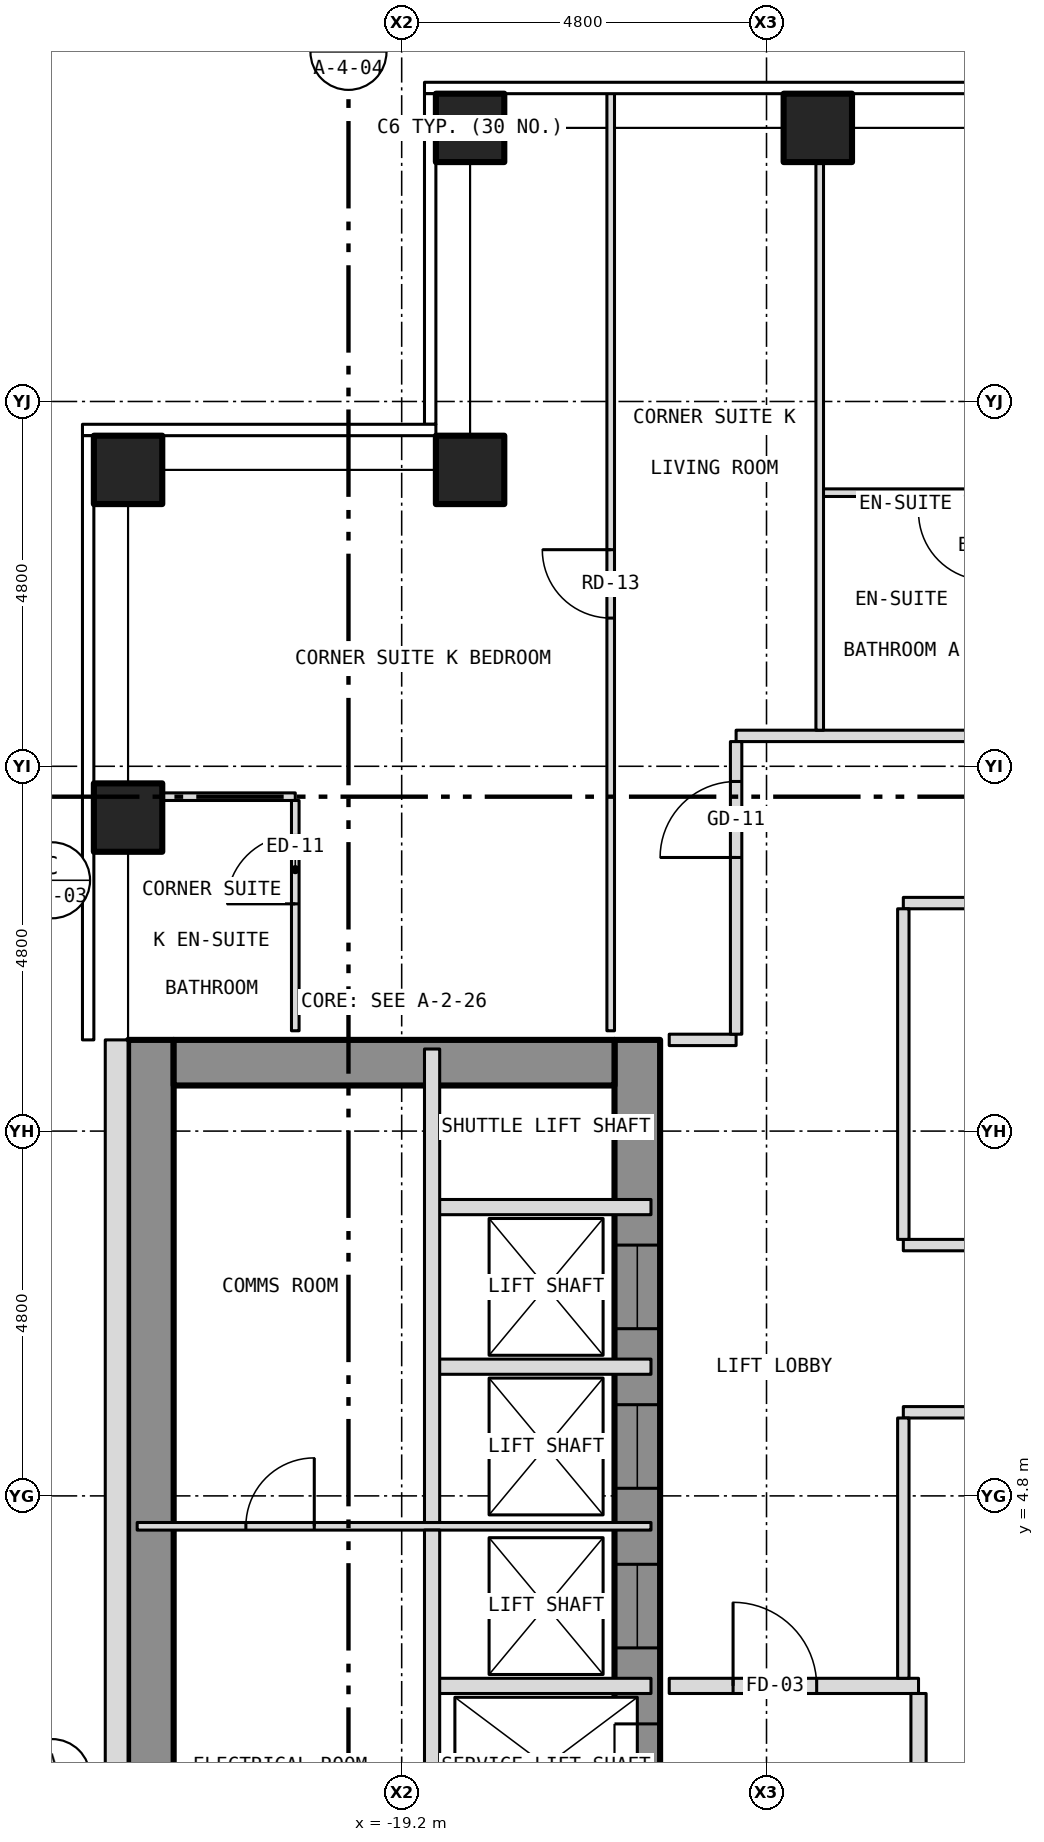
"""IFC4 building model, lengths in metres.
Left out: names, types, materials, properties, quantities, classifications, styles, units other than length and angle.
Written with IfcOpenShell. Run it as: python <this file> out.ifc"""

import sys

from ifc_helpers import new_model, si_unit, direction, frame, frame_2d, origin, origin_2d, place, context, subcontext, project, spatial, rectangle, hollow_rectangle, extrude, element, fill, save


model = new_model("IFC4")
c1 = context("Model", 3, precision=1e-05, world=origin(), true_north=direction((0.0, 1.0)))
c2 = subcontext(c1, "Body", "Model", "MODEL_VIEW")
j1 = project(units=[si_unit("LENGTHUNIT", "METRE"), si_unit("PLANEANGLEUNIT", "RADIAN")], contexts=[c1])
p1 = place(None, origin())
s1 = spatial("IfcSite", under=j1, at=p1, CompositionType="ELEMENT")
p2 = place(p1, origin())
s2 = spatial("IfcBuilding", under=s1, at=p2, CompositionType="ELEMENT")
p3 = place(p2, frame((0.0, 0.0, 96.0)))
s3 = spatial("IfcBuildingStorey", under=s2, at=p3, CompositionType="ELEMENT", Elevation=96.0)
for number, where, z_axis, x_axis in (
    (1, (-18.3, 22.8, -0.15), (0.0, 0.0, 1.0), (1.0, 0.0, 0.0)),
    (2, (-13.725, 22.8, -0.15), (0.0, 0.0, 1.0), (1.0, 0.0, 0.0)),
    (3, (-22.8, 13.725, -0.15), (0.0, 0.0, 1.0), (1.0, 0.0, 0.0)),
    (4, (-22.8, 18.3, -0.15), (0.0, 0.0, 1.0), (1.0, 0.0, 0.0)),
    (5, (-18.3, 18.3, -0.15), (0.0, 0.0, 1.0), (1.0, 0.0, 0.0)),
):
    element("IfcColumn", number, at=place(p3, frame(where, z_axis=z_axis, x_axis=x_axis)), inside=s3, PredefinedType="COLUMN", context=c2, shape_type="SweptSolid", body=[
        extrude(hollow_rectangle(XDim=0.9, YDim=0.9, WallThickness=0.05, at=origin_2d()), origin(), (0.0, 0.0, 1.0), 3.5),
    ])
p4 = place(p3, frame((-16.1, -10.8, 0.0), z_axis=(0.0, 0.0, 1.0), x_axis=(0.0, 1.0, 0.0)))
e6 = element("IfcWall", 6, at=p4, inside=s3, PredefinedType="SHEAR", context=c2, shape_type="SweptSolid", body=[
    extrude(rectangle(XDim=21.6, YDim=0.6, at=frame_2d((10.8, 0.0))), origin(), (0.0, 0.0, 1.0), 3.25),
])
p5 = place(p4, frame((9.4, 0.0, 0.0)))
e7 = element("IfcOpeningElement", 7, at=p5, cuts=e6, PredefinedType="OPENING", context=c2, shape_type="SweptSolid", body=[
    extrude(rectangle(XDim=1.1, YDim=2.1, at=frame_2d((0.55, 1.05))), frame((0.0, 0.312, 0.0), z_axis=(0.0, -1.0, 0.0), x_axis=(1.0, 0.0, 0.0)), (0.0, 0.0, 1.0), 0.624),
])
p6 = place(p4, frame((11.5, 0.0, 0.0)))
e8 = element("IfcOpeningElement", 8, at=p6, cuts=e6, PredefinedType="OPENING", context=c2, shape_type="SweptSolid", body=[
    extrude(rectangle(XDim=1.1, YDim=2.1, at=frame_2d((0.55, 1.05))), frame((0.0, 0.312, 0.0), z_axis=(0.0, -1.0, 0.0), x_axis=(1.0, 0.0, 0.0)), (0.0, 0.0, 1.0), 0.624),
])
p7 = place(p4, frame((13.6, 0.0, 0.0)))
e9 = element("IfcOpeningElement", 9, at=p7, cuts=e6, PredefinedType="OPENING", context=c2, shape_type="SweptSolid", body=[
    extrude(rectangle(XDim=1.1, YDim=2.1, at=frame_2d((0.55, 1.05))), frame((0.0, 0.312, 0.0), z_axis=(0.0, -1.0, 0.0), x_axis=(1.0, 0.0, 0.0)), (0.0, 0.0, 1.0), 0.624),
])
p8 = place(p4, frame((15.7, 0.0, 0.0)))
e10 = element("IfcOpeningElement", 10, at=p8, cuts=e6, PredefinedType="OPENING", context=c2, shape_type="SweptSolid", body=[
    extrude(rectangle(XDim=1.1, YDim=2.1, at=frame_2d((0.55, 1.05))), frame((0.0, 0.312, 0.0), z_axis=(0.0, -1.0, 0.0), x_axis=(1.0, 0.0, 0.0)), (0.0, 0.0, 1.0), 0.624),
])
p9 = place(p4, frame((17.8, 0.0, 0.0)))
e11 = element("IfcOpeningElement", 11, at=p9, cuts=e6, PredefinedType="OPENING", context=c2, shape_type="SweptSolid", body=[
    extrude(rectangle(XDim=1.1, YDim=2.1, at=frame_2d((0.55, 1.05))), frame((0.0, 0.312, 0.0), z_axis=(0.0, -1.0, 0.0), x_axis=(1.0, 0.0, 0.0)), (0.0, 0.0, 1.0), 0.624),
])
p10 = place(p4, frame((0.758, 0.0, 0.0)))
e12 = element("IfcOpeningElement", 12, at=p10, cuts=e6, PredefinedType="OPENING", context=c2, shape_type="SweptSolid", body=[
    extrude(rectangle(XDim=1.1, YDim=2.1, at=frame_2d((0.55, 1.05))), frame((0.0, 0.312, 0.0), z_axis=(0.0, -1.0, 0.0), x_axis=(1.0, 0.0, 0.0)), (0.0, 0.0, 1.0), 0.624),
])
p11 = place(p4, frame((7.5, 0.0, 0.0)))
e13 = element("IfcOpeningElement", 13, at=p11, cuts=e6, PredefinedType="OPENING", context=c2, shape_type="SweptSolid", body=[
    extrude(rectangle(XDim=1.1, YDim=2.1, at=frame_2d((0.55, 1.05))), frame((0.0, 0.312, 0.0), z_axis=(0.0, -1.0, 0.0), x_axis=(1.0, 0.0, 0.0)), (0.0, 0.0, 1.0), 0.624),
])
p12 = place(p3, frame((-22.5, -10.8, 0.0), z_axis=(0.0, 0.0, 1.0), x_axis=(0.0, 1.0, 0.0)))
e14 = element("IfcWall", 14, at=p12, inside=s3, PredefinedType="SHEAR", context=c2, shape_type="SweptSolid", body=[
    extrude(rectangle(XDim=21.6, YDim=0.6, at=frame_2d((10.8, 0.0))), origin(), (0.0, 0.0, 1.0), 3.25),
])
p13 = place(p3, frame((-22.2, 10.5, 0.0), z_axis=(0.0, 0.0, 1.0), x_axis=(1.0, 0.0, 0.0)))
e15 = element("IfcWall", 15, at=p13, inside=s3, PredefinedType="SHEAR", context=c2, shape_type="SweptSolid", body=[
    extrude(rectangle(XDim=5.8, YDim=0.6, at=frame_2d((2.9, 0.0))), origin(), (0.0, 0.0, 1.0), 3.25),
])
p14 = place(p3, frame((-22.95, 10.8, 0.0), z_axis=(0.0, 0.0, 1.0), x_axis=(0.0, -1.0, 0.0)))
e16 = element("IfcWall", 16, at=p14, inside=s3, PredefinedType="SOLIDWALL", context=c2, shape_type="SweptSolid", body=[
    extrude(rectangle(XDim=21.6, YDim=0.3, at=frame_2d((10.8, 0.0))), origin(), (0.0, 0.0, 1.0), 3.5),
])
p15 = place(p14, frame((18.05, 0.0, 1.0)))
e17 = element("IfcOpeningElement", 17, at=p15, cuts=e16, PredefinedType="OPENING", context=c2, shape_type="SweptSolid", body=[
    extrude(rectangle(XDim=0.6, YDim=1.5, at=frame_2d((0.3, 0.75))), frame((0.0, 0.162, 0.0), z_axis=(0.0, -1.0, 0.0), x_axis=(1.0, 0.0, 0.0)), (0.0, 0.0, 1.0), 0.324),
])
p16 = place(p3, frame((-18.8, 2.3, 0.0), z_axis=(0.0, 0.0, 1.0), x_axis=(1.0, 0.0, 0.0)))
e18 = element("IfcWall", 18, at=p16, inside=s3, PredefinedType="PARTITIONING", context=c2, shape_type="SweptSolid", body=[
    extrude(rectangle(XDim=2.88, YDim=0.2, at=frame_2d((1.44, 0.0))), origin(), (0.0, 0.0, 1.0), 3.25),
])
p17 = place(p3, frame((-15.68, 2.3, 0.0), z_axis=(0.0, 0.0, 1.0), x_axis=(1.0, 0.0, 0.0)))
e19 = element("IfcWall", 19, at=p17, inside=s3, PredefinedType="PARTITIONING", context=c2, shape_type="SweptSolid", body=[
    extrude(rectangle(XDim=3.28, YDim=0.2, at=frame_2d((1.64, 0.0))), origin(), (0.0, 0.0, 1.0), 3.35),
])
p18 = place(p17, frame((0.84, 0.0, 0.0)))
e20 = element("IfcOpeningElement", 20, at=p18, cuts=e19, PredefinedType="OPENING", context=c2, shape_type="SweptSolid", body=[
    extrude(rectangle(XDim=1.1, YDim=2.1, at=frame_2d((0.55, 1.05))), frame((0.0, 0.112, 0.0), z_axis=(0.0, -1.0, 0.0), x_axis=(1.0, 0.0, 0.0)), (0.0, 0.0, 1.0), 0.224),
])
p19 = place(p3, frame((-22.68, 4.4, 0.0), z_axis=(0.0, 0.0, 1.0), x_axis=(1.0, 0.0, 0.0)))
e21 = element("IfcWall", 21, at=p19, inside=s3, PredefinedType="PARTITIONING", context=c2, shape_type="SweptSolid", body=[
    extrude(rectangle(XDim=6.76, YDim=0.1, at=frame_2d((3.38, 0.0))), origin(), (0.0, 0.0, 1.0), 3.25),
])
p20 = place(p19, frame((1.43, 0.0, 0.0)))
e22 = element("IfcOpeningElement", 22, at=p20, cuts=e21, PredefinedType="OPENING", context=c2, shape_type="SweptSolid", body=[
    extrude(rectangle(XDim=0.9, YDim=2.1, at=frame_2d((0.45, 1.05))), frame((0.0, 0.062, 0.0), z_axis=(0.0, -1.0, 0.0), x_axis=(1.0, 0.0, 0.0)), (0.0, 0.0, 1.0), 0.124),
])
p21 = place(p3, frame((-12.6, 5.9, 0.0), z_axis=(0.0, 0.0, 1.0), x_axis=(1.0, 0.0, 0.0)))
e23 = element("IfcWall", 23, at=p21, inside=s3, PredefinedType="PARTITIONING", context=c2, shape_type="SweptSolid", body=[
    extrude(rectangle(XDim=13.7, YDim=0.15, at=frame_2d((6.85, 0.0))), origin(), (0.0, 0.0, 1.0), 3.35),
])
p22 = place(p3, frame((-18.8, 6.5, 0.0), z_axis=(0.0, 0.0, 1.0), x_axis=(1.0, 0.0, 0.0)))
e24 = element("IfcWall", 24, at=p22, inside=s3, PredefinedType="PARTITIONING", context=c2, shape_type="SweptSolid", body=[
    extrude(rectangle(XDim=2.88, YDim=0.2, at=frame_2d((1.44, 0.0))), origin(), (0.0, 0.0, 1.0), 3.25),
])
p23 = place(p3, frame((-12.6, 8.1, 0.0), z_axis=(0.0, 0.0, 1.0), x_axis=(1.0, 0.0, 0.0)))
e25 = element("IfcWall", 25, at=p23, inside=s3, PredefinedType="PARTITIONING", context=c2, shape_type="SweptSolid", body=[
    extrude(rectangle(XDim=13.7, YDim=0.15, at=frame_2d((6.85, 0.0))), origin(), (0.0, 0.0, 1.0), 3.35),
])
p24 = place(p23, frame((6.4, 0.0, 0.0)))
e26 = element("IfcOpeningElement", 26, at=p24, cuts=e25, PredefinedType="OPENING", context=c2, shape_type="SweptSolid", body=[
    extrude(rectangle(XDim=0.9, YDim=2.1, at=frame_2d((0.45, 1.05))), frame((0.0, 0.087, 0.0), z_axis=(0.0, -1.0, 0.0), x_axis=(1.0, 0.0, 0.0)), (0.0, 0.0, 1.0), 0.174),
])
p25 = place(p3, frame((-18.8, 8.6, 0.0), z_axis=(0.0, 0.0, 1.0), x_axis=(1.0, 0.0, 0.0)))
e27 = element("IfcWall", 27, at=p25, inside=s3, PredefinedType="PARTITIONING", context=c2, shape_type="SweptSolid", body=[
    extrude(rectangle(XDim=2.88, YDim=0.2, at=frame_2d((1.44, 0.0))), origin(), (0.0, 0.0, 1.0), 3.25),
])
p26 = place(p3, frame((-15.68, 10.8, 0.0), z_axis=(0.0, 0.0, 1.0), x_axis=(1.0, 0.0, 0.0)))
e28 = element("IfcWall", 28, at=p26, inside=s3, PredefinedType="PARTITIONING", context=c2, shape_type="SweptSolid", body=[
    extrude(rectangle(XDim=0.88, YDim=0.15, at=frame_2d((0.44, 0.0))), origin(), (0.0, 0.0, 1.0), 3.35),
])
p27 = place(p3, frame((-12.6, 12.6, 0.0), z_axis=(0.0, 0.0, 1.0), x_axis=(1.0, 0.0, 0.0)))
e29 = element("IfcWall", 29, at=p27, inside=s3, PredefinedType="PARTITIONING", context=c2, shape_type="SweptSolid", body=[
    extrude(rectangle(XDim=13.7, YDim=0.15, at=frame_2d((6.85, 0.0))), origin(), (0.0, 0.0, 1.0), 3.35),
])
p28 = place(p3, frame((-22.68, 14.0, 0.0), z_axis=(0.0, 0.0, 1.0), x_axis=(1.0, 0.0, 0.0)))
e30 = element("IfcWall", 30, at=p28, inside=s3, PredefinedType="PARTITIONING", context=c2, shape_type="SweptSolid", body=[
    extrude(rectangle(XDim=2.08, YDim=0.1, at=frame_2d((1.04, 0.0))), origin(), (0.0, 0.0, 1.0), 3.35),
])
p29 = place(p3, frame((-14.8, 14.8, 0.0), z_axis=(0.0, 0.0, 1.0), x_axis=(1.0, 0.0, 0.0)))
e31 = element("IfcWall", 31, at=p29, inside=s3, PredefinedType="PARTITIONING", context=c2, shape_type="SweptSolid", body=[
    extrude(rectangle(XDim=29.6, YDim=0.15, at=frame_2d((14.8, 0.0))), origin(), (0.0, 0.0, 1.0), 3.35),
])
p30 = place(p29, frame((5.107, 0.0, 0.0)))
e32 = element("IfcOpeningElement", 32, at=p30, cuts=e31, PredefinedType="OPENING", context=c2, shape_type="SweptSolid", body=[
    extrude(rectangle(XDim=1.0, YDim=2.1, at=frame_2d((0.5, 1.05))), frame((0.0, 0.087, 0.0), z_axis=(0.0, -1.0, 0.0), x_axis=(1.0, 0.0, 0.0)), (0.0, 0.0, 1.0), 0.174),
])
p31 = place(p29, frame((10.826, 0.0, 0.0)))
e33 = element("IfcOpeningElement", 33, at=p31, cuts=e31, PredefinedType="OPENING", context=c2, shape_type="SweptSolid", body=[
    extrude(rectangle(XDim=1.0, YDim=2.1, at=frame_2d((0.5, 1.05))), frame((0.0, 0.087, 0.0), z_axis=(0.0, -1.0, 0.0), x_axis=(1.0, 0.0, 0.0)), (0.0, 0.0, 1.0), 0.174),
])
p32 = place(p29, frame((19.104, 0.0, 0.0)))
e34 = element("IfcOpeningElement", 34, at=p32, cuts=e31, PredefinedType="OPENING", context=c2, shape_type="SweptSolid", body=[
    extrude(rectangle(XDim=1.0, YDim=2.1, at=frame_2d((0.5, 1.05))), frame((0.0, 0.087, 0.0), z_axis=(0.0, -1.0, 0.0), x_axis=(1.0, 0.0, 0.0)), (0.0, 0.0, 1.0), 0.174),
])
p33 = place(p29, frame((25.694, 0.0, 0.0)))
e35 = element("IfcOpeningElement", 35, at=p33, cuts=e31, PredefinedType="OPENING", context=c2, shape_type="SweptSolid", body=[
    extrude(rectangle(XDim=1.0, YDim=2.1, at=frame_2d((0.5, 1.05))), frame((0.0, 0.087, 0.0), z_axis=(0.0, -1.0, 0.0), x_axis=(1.0, 0.0, 0.0)), (0.0, 0.0, 1.0), 0.174),
])
p34 = place(p3, frame((-13.7, 18.0, 0.0), z_axis=(0.0, 0.0, 1.0), x_axis=(1.0, 0.0, 0.0)))
e36 = element("IfcWall", 36, at=p34, inside=s3, PredefinedType="PARTITIONING", context=c2, shape_type="SweptSolid", body=[
    extrude(rectangle(XDim=2.2, YDim=0.1, at=frame_2d((1.1, 0.0))), origin(), (0.0, 0.0, 1.0), 3.35),
])
p35 = place(p3, frame((-20.6, 10.92, 0.0), z_axis=(0.0, 0.0, 1.0), x_axis=(0.0, 1.0, 0.0)))
e37 = element("IfcWall", 37, at=p35, inside=s3, PredefinedType="PARTITIONING", context=c2, shape_type="SweptSolid", body=[
    extrude(rectangle(XDim=3.03, YDim=0.1, at=frame_2d((1.515, 0.0))), origin(), (0.0, 0.0, 1.0), 3.35),
])
p36 = place(p35, frame((1.67, 0.0, 0.0)))
e38 = element("IfcOpeningElement", 38, at=p36, cuts=e37, PredefinedType="OPENING", context=c2, shape_type="SweptSolid", body=[
    extrude(rectangle(XDim=0.9, YDim=2.1, at=frame_2d((0.45, 1.05))), frame((0.0, 0.062, 0.0), z_axis=(0.0, -1.0, 0.0), x_axis=(1.0, 0.0, 0.0)), (0.0, 0.0, 1.0), 0.124),
])
p37 = place(p3, frame((-18.8, -1.8, 0.0), z_axis=(0.0, 0.0, 1.0), x_axis=(0.0, 1.0, 0.0)))
e39 = element("IfcWall", 39, at=p37, inside=s3, PredefinedType="PARTITIONING", context=c2, shape_type="SweptSolid", body=[
    extrude(rectangle(XDim=6.15, YDim=0.2, at=frame_2d((3.075, 0.0))), origin(), (0.0, 0.0, 1.0), 3.25),
])
p38 = place(p3, frame((-18.8, 4.45, 0.0), z_axis=(0.0, 0.0, 1.0), x_axis=(0.0, 1.0, 0.0)))
e40 = element("IfcWall", 40, at=p38, inside=s3, PredefinedType="PARTITIONING", context=c2, shape_type="SweptSolid", body=[
    extrude(rectangle(XDim=6.23, YDim=0.2, at=frame_2d((3.115, 0.0))), origin(), (0.0, 0.0, 1.0), 3.25),
])
p39 = place(p3, frame((-16.45, 10.92, 0.0), z_axis=(0.0, 0.0, 1.0), x_axis=(0.0, 1.0, 0.0)))
e41 = element("IfcWall", 41, at=p39, inside=s3, PredefinedType="PARTITIONING", context=c2, shape_type="SweptSolid", body=[
    extrude(rectangle(XDim=12.36, YDim=0.1, at=frame_2d((6.18, 0.0))), origin(), (0.0, 0.0, 1.0), 3.35),
])
p40 = place(p39, frame((5.43, 0.0, 0.0)))
e42 = element("IfcOpeningElement", 42, at=p40, cuts=e41, PredefinedType="OPENING", context=c2, shape_type="SweptSolid", body=[
    extrude(rectangle(XDim=0.9, YDim=2.1, at=frame_2d((0.45, 1.05))), frame((0.0, 0.062, 0.0), z_axis=(0.0, -1.0, 0.0), x_axis=(1.0, 0.0, 0.0)), (0.0, 0.0, 1.0), 0.124),
])
p41 = place(p3, frame((-14.8, 10.875, 0.0), z_axis=(0.0, 0.0, 1.0), x_axis=(0.0, 1.0, 0.0)))
e43 = element("IfcWall", 43, at=p41, inside=s3, PredefinedType="PARTITIONING", context=c2, shape_type="SweptSolid", body=[
    extrude(rectangle(XDim=3.85, YDim=0.15, at=frame_2d((1.925, 0.0))), origin(), (0.0, 0.0, 1.0), 3.35),
])
p42 = place(p41, frame((2.325, 0.0, 0.0)))
e44 = element("IfcOpeningElement", 44, at=p42, cuts=e43, PredefinedType="OPENING", context=c2, shape_type="SweptSolid", body=[
    extrude(rectangle(XDim=1.0, YDim=2.1, at=frame_2d((0.5, 1.05))), frame((0.0, 0.087, 0.0), z_axis=(0.0, -1.0, 0.0), x_axis=(1.0, 0.0, 0.0)), (0.0, 0.0, 1.0), 0.174),
])
p43 = place(p3, frame((-13.7, 14.875, 0.0), z_axis=(0.0, 0.0, 1.0), x_axis=(0.0, 1.0, 0.0)))
e45 = element("IfcWall", 45, at=p43, inside=s3, PredefinedType="PARTITIONING", context=c2, shape_type="SweptSolid", body=[
    extrude(rectangle(XDim=7.805, YDim=0.1, at=frame_2d((3.902, 0.0))), origin(), (0.0, 0.0, 1.0), 3.35),
])
p44 = place(p3, frame((-12.6, 2.4, 0.0), z_axis=(0.0, 0.0, 1.0), x_axis=(0.0, 1.0, 0.0)))
e46 = element("IfcWall", 46, at=p44, inside=s3, PredefinedType="PARTITIONING", context=c2, shape_type="SweptSolid", body=[
    extrude(rectangle(XDim=3.425, YDim=0.15, at=frame_2d((1.712, 0.0))), origin(), (0.0, 0.0, 1.0), 3.35),
])
p45 = place(p3, frame((-12.6, 8.175, 0.0), z_axis=(0.0, 0.0, 1.0), x_axis=(0.0, 1.0, 0.0)))
e47 = element("IfcWall", 47, at=p45, inside=s3, PredefinedType="PARTITIONING", context=c2, shape_type="SweptSolid", body=[
    extrude(rectangle(XDim=4.35, YDim=0.15, at=frame_2d((2.175, 0.0))), origin(), (0.0, 0.0, 1.0), 3.35),
])
p46 = place(p3, frame((-12.4, -1.8, 0.0), z_axis=(0.0, 0.0, 1.0), x_axis=(0.0, 1.0, 0.0)))
e48 = element("IfcWall", 48, at=p46, inside=s3, PredefinedType="PARTITIONING", context=c2, shape_type="SweptSolid", body=[
    extrude(rectangle(XDim=4.0, YDim=0.2, at=frame_2d((2.0, 0.0))), origin(), (0.0, 0.0, 1.0), 3.35),
])
p47 = place(p6, origin())
e49 = element("IfcDoor", 49, at=p47, inside=s3, OperationType="SLIDING_TO_LEFT", PredefinedType="DOOR", context=c2, shape_type="SweptSolid", body=[
    extrude(rectangle(XDim=1.1, YDim=2.1, at=frame_2d((0.55, 1.05))), frame((0.0, 0.025, 0.0), z_axis=(0.0, -1.0, 0.0), x_axis=(1.0, 0.0, 0.0)), (0.0, 0.0, 1.0), 0.05),
])
fill(e8, e49)
p48 = place(p7, origin())
e50 = element("IfcDoor", 50, at=p48, inside=s3, OperationType="SLIDING_TO_LEFT", PredefinedType="DOOR", context=c2, shape_type="SweptSolid", body=[
    extrude(rectangle(XDim=1.1, YDim=2.1, at=frame_2d((0.55, 1.05))), frame((0.0, 0.025, 0.0), z_axis=(0.0, -1.0, 0.0), x_axis=(1.0, 0.0, 0.0)), (0.0, 0.0, 1.0), 0.05),
])
fill(e9, e50)
p49 = place(p8, origin())
e51 = element("IfcDoor", 51, at=p49, inside=s3, OperationType="SLIDING_TO_LEFT", PredefinedType="DOOR", context=c2, shape_type="SweptSolid", body=[
    extrude(rectangle(XDim=1.1, YDim=2.1, at=frame_2d((0.55, 1.05))), frame((0.0, 0.025, 0.0), z_axis=(0.0, -1.0, 0.0), x_axis=(1.0, 0.0, 0.0)), (0.0, 0.0, 1.0), 0.05),
])
fill(e10, e51)
p50 = place(p9, origin())
e52 = element("IfcDoor", 52, at=p50, inside=s3, OperationType="SLIDING_TO_LEFT", PredefinedType="DOOR", context=c2, shape_type="SweptSolid", body=[
    extrude(rectangle(XDim=1.1, YDim=2.1, at=frame_2d((0.55, 1.05))), frame((0.0, 0.025, 0.0), z_axis=(0.0, -1.0, 0.0), x_axis=(1.0, 0.0, 0.0)), (0.0, 0.0, 1.0), 0.05),
])
fill(e11, e52)
p51 = place(p20, origin())
e53 = element("IfcDoor", 53, at=p51, inside=s3, OperationType="SINGLE_SWING_RIGHT", PredefinedType="DOOR", context=c2, shape_type="SweptSolid", body=[
    extrude(rectangle(XDim=0.9, YDim=2.1, at=frame_2d((0.45, 1.05))), frame((0.0, 0.025, 0.0), z_axis=(0.0, -1.0, 0.0), x_axis=(1.0, 0.0, 0.0)), (0.0, 0.0, 1.0), 0.05),
])
fill(e22, e53)
p52 = place(p18, origin())
e54 = element("IfcDoor", 54, at=p52, inside=s3, OperationType="SINGLE_SWING_LEFT", PredefinedType="DOOR", context=c2, shape_type="SweptSolid", body=[
    extrude(rectangle(XDim=1.1, YDim=2.1, at=frame_2d((0.55, 1.05))), frame((0.0, 0.025, 0.0), z_axis=(0.0, -1.0, 0.0), x_axis=(1.0, 0.0, 0.0)), (0.0, 0.0, 1.0), 0.05),
])
fill(e20, e54)
p53 = place(p42, origin())
e55 = element("IfcDoor", 55, at=p53, inside=s3, OperationType="SINGLE_SWING_LEFT", PredefinedType="DOOR", context=c2, shape_type="SweptSolid", body=[
    extrude(rectangle(XDim=1.0, YDim=2.1, at=frame_2d((0.5, 1.05))), frame((0.0, 0.025, 0.0), z_axis=(0.0, -1.0, 0.0), x_axis=(1.0, 0.0, 0.0)), (0.0, 0.0, 1.0), 0.05),
])
fill(e44, e55)
p54 = place(p40, origin())
e56 = element("IfcDoor", 56, at=p54, inside=s3, OperationType="SINGLE_SWING_RIGHT", PredefinedType="DOOR", context=c2, shape_type="SweptSolid", body=[
    extrude(rectangle(XDim=0.9, YDim=2.1, at=frame_2d((0.45, 1.05))), frame((0.0, 0.025, 0.0), z_axis=(0.0, -1.0, 0.0), x_axis=(1.0, 0.0, 0.0)), (0.0, 0.0, 1.0), 0.05),
])
fill(e42, e56)
p55 = place(p36, origin())
e57 = element("IfcDoor", 57, at=p55, inside=s3, OperationType="SINGLE_SWING_LEFT", PredefinedType="DOOR", context=c2, shape_type="SweptSolid", body=[
    extrude(rectangle(XDim=0.9, YDim=2.1, at=frame_2d((0.45, 1.05))), frame((0.0, 0.025, 0.0), z_axis=(0.0, -1.0, 0.0), x_axis=(1.0, 0.0, 0.0)), (0.0, 0.0, 1.0), 0.05),
])
fill(e38, e57)
save(model, sys.argv[1])
